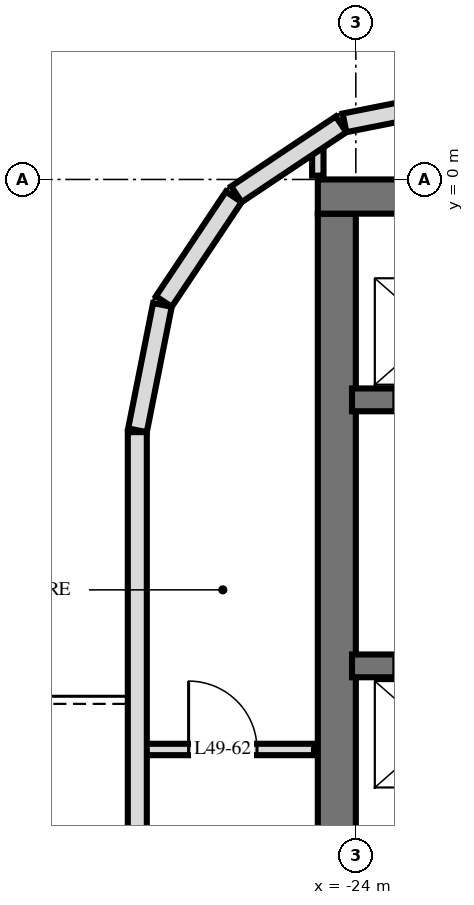
"""IFC4 building model, lengths in metres.
Left out: names, types, materials, properties, quantities, classifications, styles, units other than length and angle.
Written with IfcOpenShell. Run it as: python <this file> out.ifc"""

import sys

from ifc_helpers import new_model, si_unit, direction, frame, frame_2d, origin, place, context, subcontext, project, spatial, rectangle, extrude, element, fill, save


model = new_model("IFC4")
c1 = context("Model", 3, precision=1e-05, world=origin(), true_north=direction((0.0, 1.0)))
c2 = subcontext(c1, "Body", "Model", "MODEL_VIEW")
j1 = project(units=[si_unit("LENGTHUNIT", "METRE"), si_unit("PLANEANGLEUNIT", "RADIAN")], contexts=[c1])
p1 = place(None, origin())
s1 = spatial("IfcSite", under=j1, at=p1, CompositionType="ELEMENT")
p2 = place(p1, origin())
s2 = spatial("IfcBuilding", under=s1, at=p2, CompositionType="ELEMENT")
p3 = place(p2, frame((0.0, 0.0, 190.6)))
s3 = spatial("IfcBuildingStorey", under=s2, at=p3, CompositionType="ELEMENT", Elevation=190.6)
p4 = place(p3, frame((-24.5, -0.225, 0.0), z_axis=(0.0, 0.0, 1.0), x_axis=(1.0, 0.0, 0.0)))
e1 = element("IfcWall", 1, at=p4, inside=s3, PredefinedType="SHEAR", context=c2, shape_type="SweptSolid", body=[
    extrude(rectangle(XDim=14.5, YDim=0.45, at=frame_2d((7.25, 0.0))), origin(), (0.0, 0.0, 1.0), 3.5),
])
p5 = place(p3, frame((-24.25, -14.55, 0.0), z_axis=(0.0, 0.0, 1.0), x_axis=(0.0, 1.0, 0.0)))
e2 = element("IfcWall", 2, at=p5, inside=s3, PredefinedType="SHEAR", context=c2, shape_type="SweptSolid", body=[
    extrude(rectangle(XDim=14.1, YDim=0.5, at=frame_2d((7.05, 0.0))), origin(), (0.0, 0.0, 1.0), 3.5),
])
p6 = place(p3, frame((-24.05, -2.9, 0.0), z_axis=(0.0, 0.0, 1.0), x_axis=(1.0, 0.0, 0.0)))
e3 = element("IfcWall", 3, at=p6, inside=s3, PredefinedType="SHEAR", context=c2, shape_type="SweptSolid", body=[
    extrude(rectangle(XDim=13.7, YDim=0.3, at=frame_2d((6.85, 0.0))), origin(), (0.0, 0.0, 1.0), 3.5),
])
p7 = place(p6, frame((0.55, 0.0, 0.0)))
e4 = element("IfcOpeningElement", 4, at=p7, cuts=e3, PredefinedType="OPENING", context=c2, shape_type="SweptSolid", body=[
    extrude(rectangle(XDim=1.1, YDim=2.1, at=frame_2d((0.55, 1.05))), frame((0.0, 0.16, 0.0), z_axis=(0.0, -1.0, 0.0), x_axis=(1.0, 0.0, 0.0)), (0.0, 0.0, 1.0), 0.32),
])
p8 = place(p6, frame((5.9, 0.0, 0.0)))
e5 = element("IfcOpeningElement", 5, at=p8, cuts=e3, PredefinedType="OPENING", context=c2, shape_type="SweptSolid", body=[
    extrude(rectangle(XDim=0.9, YDim=2.1, at=frame_2d((0.45, 1.05))), frame((0.0, 0.16, 0.0), z_axis=(0.0, -1.0, 0.0), x_axis=(1.0, 0.0, 0.0)), (0.0, 0.0, 1.0), 0.32),
])
p9 = place(p6, frame((11.85, 0.0, 0.0)))
e6 = element("IfcOpeningElement", 6, at=p9, cuts=e3, PredefinedType="OPENING", context=c2, shape_type="SweptSolid", body=[
    extrude(rectangle(XDim=1.0, YDim=2.1, at=frame_2d((0.5, 1.05))), frame((0.0, 0.16, 0.0), z_axis=(0.0, -1.0, 0.0), x_axis=(1.0, 0.0, 0.0)), (0.0, 0.0, 1.0), 0.32),
])
p10 = place(p6, frame((8.85, 0.0, 0.0)))
e7 = element("IfcOpeningElement", 7, at=p10, cuts=e3, PredefinedType="OPENING", context=c2, shape_type="SweptSolid", body=[
    extrude(rectangle(XDim=1.0, YDim=2.1, at=frame_2d((0.5, 1.05))), frame((0.0, 0.16, 0.0), z_axis=(0.0, -1.0, 0.0), x_axis=(1.0, 0.0, 0.0)), (0.0, 0.0, 1.0), 0.32),
])
p11 = place(p6, frame((3.0, 0.0, 0.0)))
e8 = element("IfcOpeningElement", 8, at=p11, cuts=e3, PredefinedType="OPENING", context=c2, shape_type="SweptSolid", body=[
    extrude(rectangle(XDim=1.0, YDim=2.1, at=frame_2d((0.5, 1.05))), frame((0.0, 0.16, 0.0), z_axis=(0.0, -1.0, 0.0), x_axis=(1.0, 0.0, 0.0)), (0.0, 0.0, 1.0), 0.32),
])
p12 = place(p3, frame((-24.05, -6.4, 0.0), z_axis=(0.0, 0.0, 1.0), x_axis=(1.0, 0.0, 0.0)))
e9 = element("IfcWall", 9, at=p12, inside=s3, PredefinedType="SHEAR", context=c2, shape_type="SweptSolid", body=[
    extrude(rectangle(XDim=13.7, YDim=0.3, at=frame_2d((6.85, 0.0))), origin(), (0.0, 0.0, 1.0), 3.5),
])
p13 = place(p12, frame((0.55, 0.0, 0.0)))
e10 = element("IfcOpeningElement", 10, at=p13, cuts=e9, PredefinedType="OPENING", context=c2, shape_type="SweptSolid", body=[
    extrude(rectangle(XDim=1.1, YDim=2.1, at=frame_2d((0.55, 1.05))), frame((0.0, 0.16, 0.0), z_axis=(0.0, -1.0, 0.0), x_axis=(1.0, 0.0, 0.0)), (0.0, 0.0, 1.0), 0.32),
])
p14 = place(p12, frame((5.8, 0.0, 0.0)))
e11 = element("IfcOpeningElement", 11, at=p14, cuts=e9, PredefinedType="OPENING", context=c2, shape_type="SweptSolid", body=[
    extrude(rectangle(XDim=1.1, YDim=2.1, at=frame_2d((0.55, 1.05))), frame((0.0, 0.16, 0.0), z_axis=(0.0, -1.0, 0.0), x_axis=(1.0, 0.0, 0.0)), (0.0, 0.0, 1.0), 0.32),
])
p15 = place(p3, frame((-22.5, 1.073, 0.0), z_axis=(0.0, 0.0, 1.0), x_axis=(-0.980803419081, -0.194999110559, 0.0)))
e12 = element("IfcWall", 12, at=p15, inside=s3, PredefinedType="SOLIDWALL", context=c2, shape_type="SweptSolid", body=[
    extrude(rectangle(XDim=1.681, YDim=0.25, at=frame_2d((0.841, 0.0))), origin(), (0.0, 0.0, 1.0), 3.22),
])
for number, where, z_axis, x_axis in (
    (13, (-24.194, 0.726, 0.0), (0.0, 0.0, 1.0), (-0.831, -0.556, 0.0)),
    (14, (-25.606, -0.229, 0.0), (0.0, 0.0, 1.0), (-0.556, -0.831, 0.0)),
):
    element("IfcWall", number, at=place(p3, frame(where, z_axis=z_axis, x_axis=x_axis)), inside=s3, PredefinedType="SOLIDWALL", context=c2, shape_type="SweptSolid", body=[
        extrude(rectangle(XDim=1.656, YDim=0.25, at=frame_2d((0.828, 0.0))), origin(), (0.0, 0.0, 1.0), 3.22),
    ])
p16 = place(p3, frame((-26.545, -1.651, 0.0), z_axis=(0.0, 0.0, 1.0), x_axis=(-0.194999110559, -0.980803419081, 0.0)))
e15 = element("IfcWall", 15, at=p16, inside=s3, PredefinedType="SOLIDWALL", context=c2, shape_type="SweptSolid", body=[
    extrude(rectangle(XDim=1.681, YDim=0.25, at=frame_2d((0.841, 0.0))), origin(), (0.0, 0.0, 1.0), 3.22),
])
p17 = place(p3, frame((-26.875, -3.325, 0.0), z_axis=(0.0, 0.0, 1.0), x_axis=(0.0, -1.0, 0.0)))
e16 = element("IfcWall", 16, at=p17, inside=s3, PredefinedType="SOLIDWALL", context=c2, shape_type="SweptSolid", body=[
    extrude(rectangle(XDim=21.551, YDim=0.25, at=frame_2d((10.775, 0.0))), origin(), (0.0, 0.0, 1.0), 3.22),
])
p18 = place(p17, frame((7.025, 0.0, 0.0)))
e17 = element("IfcOpeningElement", 17, at=p18, cuts=e16, PredefinedType="OPENING", context=c2, shape_type="SweptSolid", body=[
    extrude(rectangle(XDim=1.8, YDim=2.4, at=frame_2d((0.9, 1.2))), frame((0.0, 0.135, 0.0), z_axis=(0.0, -1.0, 0.0), x_axis=(1.0, 0.0, 0.0)), (0.0, 0.0, 1.0), 0.27),
])
p19 = place(p17, frame((14.075, 0.0, 0.0)))
e18 = element("IfcOpeningElement", 18, at=p19, cuts=e16, PredefinedType="OPENING", context=c2, shape_type="SweptSolid", body=[
    extrude(rectangle(XDim=1.8, YDim=2.4, at=frame_2d((0.9, 1.2))), frame((0.0, 0.135, 0.0), z_axis=(0.0, -1.0, 0.0), x_axis=(1.0, 0.0, 0.0)), (0.0, 0.0, 1.0), 0.27),
])
p20 = place(p17, frame((18.875, 0.0, 0.0)))
e19 = element("IfcOpeningElement", 19, at=p20, cuts=e16, PredefinedType="OPENING", context=c2, shape_type="SweptSolid", body=[
    extrude(rectangle(XDim=1.8, YDim=2.4, at=frame_2d((0.9, 1.2))), frame((0.0, 0.135, 0.0), z_axis=(0.0, -1.0, 0.0), x_axis=(1.0, 0.0, 0.0)), (0.0, 0.0, 1.0), 0.27),
])
p21 = place(p3, frame((-24.5, 0.05, 0.0), z_axis=(0.0, 0.0, 1.0), x_axis=(0.0, 1.0, 0.0)))
e20 = element("IfcWall", 20, at=p21, inside=s3, PredefinedType="PARTITIONING", context=c2, shape_type="SweptSolid", body=[
    extrude(rectangle(XDim=0.405, YDim=0.15, at=frame_2d((0.203, 0.0))), origin(), (0.0, 0.0, 1.0), 3.22),
])
p22 = place(p3, frame((-26.82, -7.5, 0.0), z_axis=(0.0, 0.0, 1.0), x_axis=(1.0, 0.0, 0.0)))
e21 = element("IfcWall", 21, at=p22, inside=s3, PredefinedType="PARTITIONING", context=c2, shape_type="SweptSolid", body=[
    extrude(rectangle(XDim=2.27, YDim=0.15, at=frame_2d((1.135, 0.0))), origin(), (0.0, 0.0, 1.0), 3.22),
])
p23 = place(p22, frame((0.62, 0.0, 0.0)))
e22 = element("IfcOpeningElement", 22, at=p23, cuts=e21, PredefinedType="OPENING", context=c2, shape_type="SweptSolid", body=[
    extrude(rectangle(XDim=0.9, YDim=2.1, at=frame_2d((0.45, 1.05))), frame((0.0, 0.085, 0.0), z_axis=(0.0, -1.0, 0.0), x_axis=(1.0, 0.0, 0.0)), (0.0, 0.0, 1.0), 0.17),
])
p24 = place(p23, origin())
e23 = element("IfcDoor", 23, at=p24, inside=s3, OperationType="SINGLE_SWING_RIGHT", PredefinedType="DOOR", context=c2, shape_type="SweptSolid", body=[
    extrude(rectangle(XDim=0.9, YDim=2.1, at=frame_2d((0.45, 1.05))), frame((0.0, 0.025, 0.0), z_axis=(0.0, -1.0, 0.0), x_axis=(1.0, 0.0, 0.0)), (0.0, 0.0, 1.0), 0.05),
])
fill(e22, e23)
save(model, sys.argv[1])
